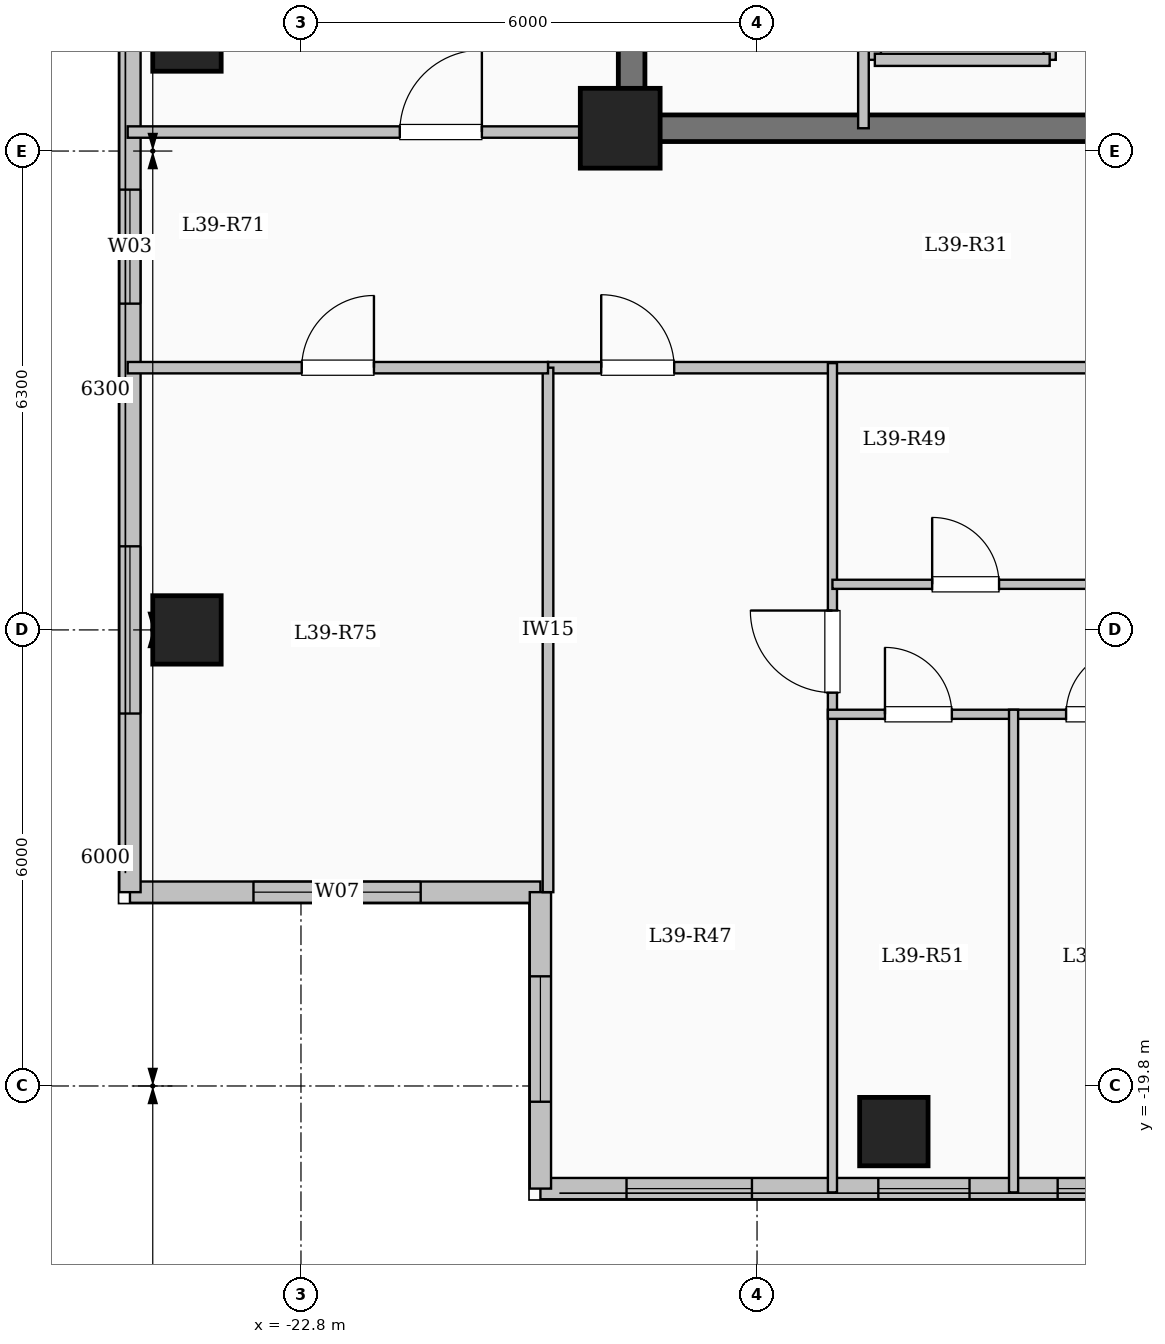
"""IFC4 building model, lengths in metres.
Left out: names, types, materials, properties, quantities, classifications, styles, units other than length and angle.
Written with IfcOpenShell. Run it as: python <this file> out.ifc"""

import sys

from ifc_helpers import new_model, si_unit, direction, frame, frame_2d, origin, origin_2d, place, context, subcontext, project, spatial, rectangle, extrude, element, fill, save


model = new_model("IFC4")
c1 = context("Model", 3, precision=1e-05, world=origin(), true_north=direction((0.0, 1.0)))
c2 = subcontext(c1, "Body", "Model", "MODEL_VIEW")
j1 = project(units=[si_unit("LENGTHUNIT", "METRE"), si_unit("PLANEANGLEUNIT", "RADIAN")], contexts=[c1])
p1 = place(None, origin())
s1 = spatial("IfcSite", under=j1, at=p1, CompositionType="ELEMENT")
p2 = place(p1, origin())
s2 = spatial("IfcBuilding", under=s1, at=p2, CompositionType="ELEMENT")
p3 = place(p2, frame((0.0, 0.0, 146.0)))
s3 = spatial("IfcBuildingStorey", under=s2, at=p3, CompositionType="ELEMENT", Elevation=146.0)
p4 = place(p3, frame((-18.6, -7.2, 0.0), z_axis=(0.0, 0.0, 1.0), x_axis=(1.0, 0.0, 0.0)))
e1 = element("IfcColumn", 1, at=p4, inside=s3, PredefinedType="COLUMN", context=c2, shape_type="SweptSolid", body=[
    extrude(rectangle(XDim=1.05, YDim=1.05, at=origin_2d()), origin(), (0.0, 0.0, 1.0), 3.35),
])
for number, where, z_axis, x_axis in (
    (2, (-15.0, -20.4, 0.0), (0.0, 0.0, 1.0), (1.0, 0.0, 0.0)),
    (3, (-24.3, -13.8, 0.0), (0.0, 0.0, 1.0), (1.0, 0.0, 0.0)),
    (4, (-24.3, -6.0, 0.0), (0.0, 0.0, 1.0), (1.0, 0.0, 0.0)),
):
    element("IfcColumn", number, at=place(p3, frame(where, z_axis=z_axis, x_axis=x_axis)), inside=s3, PredefinedType="COLUMN", context=c2, shape_type="SweptSolid", body=[
        extrude(rectangle(XDim=0.9, YDim=0.9, at=origin_2d()), origin(), (0.0, 0.0, 1.0), 3.35),
    ])
p5 = place(p3, frame((-19.65, -17.25, 0.0), z_axis=(0.0, 0.0, 1.0), x_axis=(-1.0, 0.0, 0.0)))
e5 = element("IfcWall", 5, at=p5, inside=s3, PredefinedType="SOLIDWALL", context=c2, shape_type="SweptSolid", body=[
    extrude(rectangle(XDim=5.4, YDim=0.28, at=frame_2d((2.7, 0.0))), origin(), (0.0, 0.0, 1.0), 3.1),
])
p6 = place(p5, frame((1.575, 0.0, 0.9)))
e6 = element("IfcOpeningElement", 6, at=p6, cuts=e5, PredefinedType="OPENING", context=c2, shape_type="SweptSolid", body=[
    extrude(rectangle(XDim=2.2, YDim=1.75, at=frame_2d((1.1, 0.875))), frame((0.0, 0.15, 0.0), z_axis=(0.0, -1.0, 0.0), x_axis=(1.0, 0.0, 0.0)), (0.0, 0.0, 1.0), 0.3),
])
p7 = place(p3, frame((-25.05, -17.25, 0.0), z_axis=(0.0, 0.0, 1.0), x_axis=(0.0, 1.0, 0.0)))
e7 = element("IfcWall", 7, at=p7, inside=s3, PredefinedType="SOLIDWALL", context=c2, shape_type="SweptSolid", body=[
    extrude(rectangle(XDim=34.5, YDim=0.28, at=frame_2d((17.25, 0.0))), origin(), (0.0, 0.0, 1.0), 3.1),
])
p8 = place(p7, frame((2.35, 0.0, 0.9)))
e8 = element("IfcOpeningElement", 8, at=p8, cuts=e7, PredefinedType="OPENING", context=c2, shape_type="SweptSolid", body=[
    extrude(rectangle(XDim=2.2, YDim=1.75, at=frame_2d((1.1, 0.875))), frame((0.0, 0.15, 0.0), z_axis=(0.0, -1.0, 0.0), x_axis=(1.0, 0.0, 0.0)), (0.0, 0.0, 1.0), 0.3),
])
p9 = place(p7, frame((7.742, 0.0, 0.9)))
e9 = element("IfcOpeningElement", 9, at=p9, cuts=e7, PredefinedType="OPENING", context=c2, shape_type="SweptSolid", body=[
    extrude(rectangle(XDim=1.5, YDim=1.65, at=frame_2d((0.75, 0.825))), frame((0.0, 0.15, 0.0), z_axis=(0.0, -1.0, 0.0), x_axis=(1.0, 0.0, 0.0)), (0.0, 0.0, 1.0), 0.3),
])
p10 = place(p7, frame((18.0, 0.0, 0.9)))
e10 = element("IfcOpeningElement", 10, at=p10, cuts=e7, PredefinedType="OPENING", context=c2, shape_type="SweptSolid", body=[
    extrude(rectangle(XDim=2.0, YDim=1.7, at=frame_2d((1.0, 0.85))), frame((0.0, 0.15, 0.0), z_axis=(0.0, -1.0, 0.0), x_axis=(1.0, 0.0, 0.0)), (0.0, 0.0, 1.0), 0.3),
])
p11 = place(p7, frame((28.375, 0.0, 0.95)))
e11 = element("IfcOpeningElement", 11, at=p11, cuts=e7, PredefinedType="OPENING", context=c2, shape_type="SweptSolid", body=[
    extrude(rectangle(XDim=1.0, YDim=1.5, at=frame_2d((0.5, 0.75))), frame((0.0, 0.15, 0.0), z_axis=(0.0, -1.0, 0.0), x_axis=(1.0, 0.0, 0.0)), (0.0, 0.0, 1.0), 0.3),
])
p12 = place(p7, frame((31.125, 0.0, 0.9)))
e12 = element("IfcOpeningElement", 12, at=p12, cuts=e7, PredefinedType="OPENING", context=c2, shape_type="SweptSolid", body=[
    extrude(rectangle(XDim=2.0, YDim=1.7, at=frame_2d((1.0, 0.85))), frame((0.0, 0.15, 0.0), z_axis=(0.0, -1.0, 0.0), x_axis=(1.0, 0.0, 0.0)), (0.0, 0.0, 1.0), 0.3),
])
p13 = place(p3, frame((-7.35, -21.15, 0.0), z_axis=(0.0, 0.0, 1.0), x_axis=(-1.0, 0.0, 0.0)))
e13 = element("IfcWall", 13, at=p13, inside=s3, PredefinedType="SOLIDWALL", context=c2, shape_type="SweptSolid", body=[
    extrude(rectangle(XDim=12.3, YDim=0.28, at=frame_2d((6.15, 0.0))), origin(), (0.0, 0.0, 1.0), 3.1),
])
p14 = place(p13, frame((0.147, 0.0, 0.95)))
e14 = element("IfcOpeningElement", 14, at=p14, cuts=e13, PredefinedType="OPENING", context=c2, shape_type="SweptSolid", body=[
    extrude(rectangle(XDim=0.85, YDim=1.5, at=frame_2d((0.425, 0.75))), frame((0.0, 0.15, 0.0), z_axis=(0.0, -1.0, 0.0), x_axis=(1.0, 0.0, 0.0)), (0.0, 0.0, 1.0), 0.3),
])
p15 = place(p13, frame((1.86, 0.0, 0.95)))
e15 = element("IfcOpeningElement", 15, at=p15, cuts=e13, PredefinedType="OPENING", context=c2, shape_type="SweptSolid", body=[
    extrude(rectangle(XDim=1.2, YDim=1.5, at=frame_2d((0.6, 0.75))), frame((0.0, 0.15, 0.0), z_axis=(0.0, -1.0, 0.0), x_axis=(1.0, 0.0, 0.0)), (0.0, 0.0, 1.0), 0.3),
])
p16 = place(p13, frame((4.295, 0.0, 0.95)))
e16 = element("IfcOpeningElement", 16, at=p16, cuts=e13, PredefinedType="OPENING", context=c2, shape_type="SweptSolid", body=[
    extrude(rectangle(XDim=1.2, YDim=1.5, at=frame_2d((0.6, 0.75))), frame((0.0, 0.15, 0.0), z_axis=(0.0, -1.0, 0.0), x_axis=(1.0, 0.0, 0.0)), (0.0, 0.0, 1.0), 0.3),
])
p17 = place(p13, frame((6.655, 0.0, 0.95)))
e17 = element("IfcOpeningElement", 17, at=p17, cuts=e13, PredefinedType="OPENING", context=c2, shape_type="SweptSolid", body=[
    extrude(rectangle(XDim=1.2, YDim=1.5, at=frame_2d((0.6, 0.75))), frame((0.0, 0.15, 0.0), z_axis=(0.0, -1.0, 0.0), x_axis=(1.0, 0.0, 0.0)), (0.0, 0.0, 1.0), 0.3),
])
p18 = place(p13, frame((9.517, 0.0, 0.9)))
e18 = element("IfcOpeningElement", 18, at=p18, cuts=e13, PredefinedType="OPENING", context=c2, shape_type="SweptSolid", body=[
    extrude(rectangle(XDim=1.65, YDim=1.6, at=frame_2d((0.825, 0.8))), frame((0.0, 0.15, 0.0), z_axis=(0.0, -1.0, 0.0), x_axis=(1.0, 0.0, 0.0)), (0.0, 0.0, 1.0), 0.3),
])
p19 = place(p3, frame((-19.65, -21.15, 0.0), z_axis=(0.0, 0.0, 1.0), x_axis=(0.0, 1.0, 0.0)))
e19 = element("IfcWall", 19, at=p19, inside=s3, PredefinedType="SOLIDWALL", context=c2, shape_type="SweptSolid", body=[
    extrude(rectangle(XDim=3.9, YDim=0.28, at=frame_2d((1.95, 0.0))), origin(), (0.0, 0.0, 1.0), 3.1),
])
p20 = place(p19, frame((1.143, 0.0, 0.9)))
e20 = element("IfcOpeningElement", 20, at=p20, cuts=e19, PredefinedType="OPENING", context=c2, shape_type="SweptSolid", body=[
    extrude(rectangle(XDim=1.65, YDim=1.6, at=frame_2d((0.825, 0.8))), frame((0.0, 0.15, 0.0), z_axis=(0.0, -1.0, 0.0), x_axis=(1.0, 0.0, 0.0)), (0.0, 0.0, 1.0), 0.3),
])
for number, where, z_axis, x_axis in (
    (21, (-15.25, -6.3, 0.0), (0.0, 0.0, 1.0), (0.0, 1.0, 0.0)),
    (22, (-12.95, -6.3, 0.0), (0.0, 0.0, 1.0), (0.0, 1.0, 0.0)),
):
    element("IfcWall", number, at=place(p3, frame(where, z_axis=z_axis, x_axis=x_axis)), inside=s3, PredefinedType="SOLIDWALL", context=c2, shape_type="SweptSolid", body=[
        extrude(rectangle(XDim=2.6, YDim=0.16, at=frame_2d((1.3, 0.0))), origin(), (0.0, 0.0, 1.0), 3.1),
    ])
p21 = place(p3, frame((-15.25, -6.3, 0.0), z_axis=(0.0, 0.0, 1.0), x_axis=(1.0, 0.0, 0.0)))
e23 = element("IfcWall", 23, at=p21, inside=s3, PredefinedType="SOLIDWALL", context=c2, shape_type="SweptSolid", body=[
    extrude(rectangle(XDim=2.3, YDim=0.16, at=frame_2d((1.15, 0.0))), origin(), (0.0, 0.0, 1.0), 3.1),
])
p22 = place(p3, frame((-18.45, -7.375, 0.0), z_axis=(0.0, 0.0, 1.0), x_axis=(0.0, 1.0, 0.0)))
e24 = element("IfcWall", 24, at=p22, inside=s3, PredefinedType="SHEAR", context=c2, shape_type="SweptSolid", body=[
    extrude(rectangle(XDim=14.05, YDim=0.35, at=frame_2d((7.025, 0.0))), origin(), (0.0, 0.0, 1.0), 3.35),
])
p23 = place(p3, frame((-18.625, -7.2, 0.0), z_axis=(0.0, 0.0, 1.0), x_axis=(1.0, 0.0, 0.0)))
e25 = element("IfcWall", 25, at=p23, inside=s3, PredefinedType="SHEAR", context=c2, shape_type="SweptSolid", body=[
    extrude(rectangle(XDim=8.55, YDim=0.35, at=frame_2d((4.275, 0.0))), origin(), (0.0, 0.0, 1.0), 3.35),
])
p24 = place(p3, frame((-15.4, -7.2, 0.0), z_axis=(0.0, 0.0, 1.0), x_axis=(0.0, 1.0, 0.0)))
e26 = element("IfcWall", 26, at=p24, inside=s3, PredefinedType="PARTITIONING", context=c2, shape_type="SweptSolid", body=[
    extrude(rectangle(XDim=10.45, YDim=0.14, at=frame_2d((5.225, 0.0))), origin(), (0.0, 0.0, 1.0), 3.1),
])
p25 = place(p24, frame((9.25, 0.0, 0.0)))
e27 = element("IfcOpeningElement", 27, at=p25, cuts=e26, PredefinedType="OPENING", context=c2, shape_type="SweptSolid", body=[
    extrude(rectangle(XDim=0.9, YDim=2.08, at=frame_2d((0.45, 1.04))), frame((0.0, 0.08, 0.0), z_axis=(0.0, -1.0, 0.0), x_axis=(1.0, 0.0, 0.0)), (0.0, 0.0, 1.0), 0.16),
])
p26 = place(p3, frame((-19.55, -10.35, 0.0), z_axis=(0.0, 0.0, 1.0), x_axis=(1.0, 0.0, 0.0)))
e28 = element("IfcWall", 28, at=p26, inside=s3, PredefinedType="PARTITIONING", context=c2, shape_type="SweptSolid", body=[
    extrude(rectangle(XDim=11.0, YDim=0.15, at=frame_2d((5.5, 0.0))), origin(), (0.0, 0.0, 1.0), 3.1),
])
p27 = place(p26, frame((0.7, 0.0, 0.0)))
e29 = element("IfcOpeningElement", 29, at=p27, cuts=e28, PredefinedType="OPENING", context=c2, shape_type="SweptSolid", body=[
    extrude(rectangle(XDim=0.96, YDim=2.15, at=frame_2d((0.48, 1.075))), frame((0.0, 0.085, 0.0), z_axis=(0.0, -1.0, 0.0), x_axis=(1.0, 0.0, 0.0)), (0.0, 0.0, 1.0), 0.17),
])
p28 = place(p3, frame((-15.808, -21.2, 0.0), z_axis=(0.0, 0.0, 1.0), x_axis=(0.0, 1.0, 0.0)))
e30 = element("IfcWall", 30, at=p28, inside=s3, PredefinedType="PARTITIONING", context=c2, shape_type="SweptSolid", body=[
    extrude(rectangle(XDim=10.91, YDim=0.12, at=frame_2d((5.455, 0.0))), origin(), (0.0, 0.0, 1.0), 3.1),
])
p29 = place(p28, frame((6.575, 0.0, 0.0)))
e31 = element("IfcOpeningElement", 31, at=p29, cuts=e30, PredefinedType="OPENING", context=c2, shape_type="SweptSolid", body=[
    extrude(rectangle(XDim=1.08, YDim=2.15, at=frame_2d((0.54, 1.075))), frame((0.0, 0.07, 0.0), z_axis=(0.0, -1.0, 0.0), x_axis=(1.0, 0.0, 0.0)), (0.0, 0.0, 1.0), 0.14),
])
p30 = place(p3, frame((-15.808, -13.2, 0.0), z_axis=(0.0, 0.0, 1.0), x_axis=(1.0, 0.0, 0.0)))
e32 = element("IfcWall", 32, at=p30, inside=s3, PredefinedType="PARTITIONING", context=c2, shape_type="SweptSolid", body=[
    extrude(rectangle(XDim=3.503, YDim=0.12, at=frame_2d((1.751, 0.0))), origin(), (0.0, 0.0, 1.0), 3.1),
])
p31 = place(p30, frame((1.312, 0.0, 0.0)))
e33 = element("IfcOpeningElement", 33, at=p31, cuts=e32, PredefinedType="OPENING", context=c2, shape_type="SweptSolid", body=[
    extrude(rectangle(XDim=0.88, YDim=2.1, at=frame_2d((0.44, 1.05))), frame((0.0, 0.07, 0.0), z_axis=(0.0, -1.0, 0.0), x_axis=(1.0, 0.0, 0.0)), (0.0, 0.0, 1.0), 0.14),
])
p32 = place(p3, frame((-15.868, -14.91, 0.0), z_axis=(0.0, 0.0, 1.0), x_axis=(1.0, 0.0, 0.0)))
e34 = element("IfcWall", 34, at=p32, inside=s3, PredefinedType="PARTITIONING", context=c2, shape_type="SweptSolid", body=[
    extrude(rectangle(XDim=7.328, YDim=0.12, at=frame_2d((3.664, 0.0))), origin(), (0.0, 0.0, 1.0), 3.1),
])
p33 = place(p32, frame((0.751, 0.0, 0.0)))
e35 = element("IfcOpeningElement", 35, at=p33, cuts=e34, PredefinedType="OPENING", context=c2, shape_type="SweptSolid", body=[
    extrude(rectangle(XDim=0.88, YDim=2.1, at=frame_2d((0.44, 1.05))), frame((0.0, 0.07, 0.0), z_axis=(0.0, -1.0, 0.0), x_axis=(1.0, 0.0, 0.0)), (0.0, 0.0, 1.0), 0.14),
])
p34 = place(p32, frame((3.134, 0.0, 0.0)))
e36 = element("IfcOpeningElement", 36, at=p34, cuts=e34, PredefinedType="OPENING", context=c2, shape_type="SweptSolid", body=[
    extrude(rectangle(XDim=0.88, YDim=2.1, at=frame_2d((0.44, 1.05))), frame((0.0, 0.07, 0.0), z_axis=(0.0, -1.0, 0.0), x_axis=(1.0, 0.0, 0.0)), (0.0, 0.0, 1.0), 0.14),
])
p35 = place(p32, frame((5.517, 0.0, 0.0)))
e37 = element("IfcOpeningElement", 37, at=p35, cuts=e34, PredefinedType="OPENING", context=c2, shape_type="SweptSolid", body=[
    extrude(rectangle(XDim=0.88, YDim=2.1, at=frame_2d((0.44, 1.05))), frame((0.0, 0.07, 0.0), z_axis=(0.0, -1.0, 0.0), x_axis=(1.0, 0.0, 0.0)), (0.0, 0.0, 1.0), 0.14),
])
p36 = place(p3, frame((-13.425, -21.2, 0.0), z_axis=(0.0, 0.0, 1.0), x_axis=(0.0, 1.0, 0.0)))
e38 = element("IfcWall", 38, at=p36, inside=s3, PredefinedType="PARTITIONING", context=c2, shape_type="SweptSolid", body=[
    extrude(rectangle(XDim=6.35, YDim=0.12, at=frame_2d((3.175, 0.0))), origin(), (0.0, 0.0, 1.0), 3.1),
])
p37 = place(p3, frame((-25.08, -7.25, 0.0), z_axis=(0.0, 0.0, 1.0), x_axis=(1.0, 0.0, 0.0)))
e39 = element("IfcWall", 39, at=p37, inside=s3, PredefinedType="PARTITIONING", context=c2, shape_type="SweptSolid", body=[
    extrude(rectangle(XDim=6.63, YDim=0.15, at=frame_2d((3.315, 0.0))), origin(), (0.0, 0.0, 1.0), 3.1),
])
p38 = place(p37, frame((3.58, 0.0, 0.0)))
e40 = element("IfcOpeningElement", 40, at=p38, cuts=e39, PredefinedType="OPENING", context=c2, shape_type="SweptSolid", body=[
    extrude(rectangle(XDim=1.08, YDim=2.15, at=frame_2d((0.54, 1.075))), frame((0.0, 0.085, 0.0), z_axis=(0.0, -1.0, 0.0), x_axis=(1.0, 0.0, 0.0)), (0.0, 0.0, 1.0), 0.17),
])
p39 = place(p3, frame((-19.55, -17.25, 0.0), z_axis=(0.0, 0.0, 1.0), x_axis=(0.0, 1.0, 0.0)))
e41 = element("IfcWall", 41, at=p39, inside=s3, PredefinedType="PARTITIONING", context=c2, shape_type="SweptSolid", body=[
    extrude(rectangle(XDim=6.9, YDim=0.14, at=frame_2d((3.45, 0.0))), origin(), (0.0, 0.0, 1.0), 3.1),
])
p40 = place(p3, frame((-25.08, -10.35, 0.0), z_axis=(0.0, 0.0, 1.0), x_axis=(1.0, 0.0, 0.0)))
e42 = element("IfcWall", 42, at=p40, inside=s3, PredefinedType="PARTITIONING", context=c2, shape_type="SweptSolid", body=[
    extrude(rectangle(XDim=5.53, YDim=0.15, at=frame_2d((2.765, 0.0))), origin(), (0.0, 0.0, 1.0), 3.1),
])
p41 = place(p40, frame((2.29, 0.0, 0.0)))
e43 = element("IfcOpeningElement", 43, at=p41, cuts=e42, PredefinedType="OPENING", context=c2, shape_type="SweptSolid", body=[
    extrude(rectangle(XDim=0.95, YDim=2.15, at=frame_2d((0.475, 1.075))), frame((0.0, 0.085, 0.0), z_axis=(0.0, -1.0, 0.0), x_axis=(1.0, 0.0, 0.0)), (0.0, 0.0, 1.0), 0.17),
])
p42 = place(p6, origin())
e44 = element("IfcWindow", 44, at=p42, inside=s3, PartitioningType="SINGLE_PANEL", PredefinedType="WINDOW", context=c2, shape_type="SweptSolid", body=[
    extrude(rectangle(XDim=2.2, YDim=1.75, at=frame_2d((1.1, 0.875))), frame((0.0, 0.03, 0.0), z_axis=(0.0, -1.0, 0.0), x_axis=(1.0, 0.0, 0.0)), (0.0, 0.0, 1.0), 0.06),
])
fill(e6, e44)
p43 = place(p8, origin())
e45 = element("IfcWindow", 45, at=p43, inside=s3, PartitioningType="SINGLE_PANEL", PredefinedType="WINDOW", context=c2, shape_type="SweptSolid", body=[
    extrude(rectangle(XDim=2.2, YDim=1.75, at=frame_2d((1.1, 0.875))), frame((0.0, 0.03, 0.0), z_axis=(0.0, -1.0, 0.0), x_axis=(1.0, 0.0, 0.0)), (0.0, 0.0, 1.0), 0.06),
])
fill(e8, e45)
p44 = place(p9, origin())
e46 = element("IfcWindow", 46, at=p44, inside=s3, PartitioningType="SINGLE_PANEL", PredefinedType="WINDOW", context=c2, shape_type="SweptSolid", body=[
    extrude(rectangle(XDim=1.5, YDim=1.65, at=frame_2d((0.75, 0.825))), frame((0.0, 0.03, 0.0), z_axis=(0.0, -1.0, 0.0), x_axis=(1.0, 0.0, 0.0)), (0.0, 0.0, 1.0), 0.06),
])
fill(e9, e46)
p45 = place(p16, origin())
e47 = element("IfcWindow", 47, at=p45, inside=s3, PartitioningType="SINGLE_PANEL", PredefinedType="WINDOW", context=c2, shape_type="SweptSolid", body=[
    extrude(rectangle(XDim=1.2, YDim=1.5, at=frame_2d((0.6, 0.75))), frame((0.0, 0.03, 0.0), z_axis=(0.0, -1.0, 0.0), x_axis=(1.0, 0.0, 0.0)), (0.0, 0.0, 1.0), 0.06),
])
fill(e16, e47)
p46 = place(p17, origin())
e48 = element("IfcWindow", 48, at=p46, inside=s3, PartitioningType="SINGLE_PANEL", PredefinedType="WINDOW", context=c2, shape_type="SweptSolid", body=[
    extrude(rectangle(XDim=1.2, YDim=1.5, at=frame_2d((0.6, 0.75))), frame((0.0, 0.03, 0.0), z_axis=(0.0, -1.0, 0.0), x_axis=(1.0, 0.0, 0.0)), (0.0, 0.0, 1.0), 0.06),
])
fill(e17, e48)
p47 = place(p18, origin())
e49 = element("IfcWindow", 49, at=p47, inside=s3, PartitioningType="SINGLE_PANEL", PredefinedType="WINDOW", context=c2, shape_type="SweptSolid", body=[
    extrude(rectangle(XDim=1.65, YDim=1.6, at=frame_2d((0.825, 0.8))), frame((0.0, 0.03, 0.0), z_axis=(0.0, -1.0, 0.0), x_axis=(1.0, 0.0, 0.0)), (0.0, 0.0, 1.0), 0.06),
])
fill(e18, e49)
p48 = place(p20, origin())
e50 = element("IfcWindow", 50, at=p48, inside=s3, PartitioningType="SINGLE_PANEL", PredefinedType="WINDOW", context=c2, shape_type="SweptSolid", body=[
    extrude(rectangle(XDim=1.65, YDim=1.6, at=frame_2d((0.825, 0.8))), frame((0.0, 0.03, 0.0), z_axis=(0.0, -1.0, 0.0), x_axis=(1.0, 0.0, 0.0)), (0.0, 0.0, 1.0), 0.06),
])
fill(e20, e50)
p49 = place(p27, origin())
e51 = element("IfcDoor", 51, at=p49, inside=s3, OperationType="SINGLE_SWING_LEFT", PredefinedType="DOOR", context=c2, shape_type="SweptSolid", body=[
    extrude(rectangle(XDim=0.96, YDim=2.15, at=frame_2d((0.48, 1.075))), frame((0.0, 0.025, 0.0), z_axis=(0.0, -1.0, 0.0), x_axis=(1.0, 0.0, 0.0)), (0.0, 0.0, 1.0), 0.05),
])
fill(e29, e51)
p50 = place(p29, origin())
e52 = element("IfcDoor", 52, at=p50, inside=s3, OperationType="SINGLE_SWING_RIGHT", PredefinedType="DOOR", context=c2, shape_type="SweptSolid", body=[
    extrude(rectangle(XDim=1.08, YDim=2.15, at=frame_2d((0.54, 1.075))), frame((0.0, 0.025, 0.0), z_axis=(0.0, -1.0, 0.0), x_axis=(1.0, 0.0, 0.0)), (0.0, 0.0, 1.0), 0.05),
])
fill(e31, e52)
p51 = place(p31, origin())
e53 = element("IfcDoor", 53, at=p51, inside=s3, OperationType="SINGLE_SWING_LEFT", PredefinedType="DOOR", context=c2, shape_type="SweptSolid", body=[
    extrude(rectangle(XDim=0.88, YDim=2.1, at=frame_2d((0.44, 1.05))), frame((0.0, 0.025, 0.0), z_axis=(0.0, -1.0, 0.0), x_axis=(1.0, 0.0, 0.0)), (0.0, 0.0, 1.0), 0.05),
])
fill(e33, e53)
p52 = place(p33, origin())
e54 = element("IfcDoor", 54, at=p52, inside=s3, OperationType="SINGLE_SWING_LEFT", PredefinedType="DOOR", context=c2, shape_type="SweptSolid", body=[
    extrude(rectangle(XDim=0.88, YDim=2.1, at=frame_2d((0.44, 1.05))), frame((0.0, 0.025, 0.0), z_axis=(0.0, -1.0, 0.0), x_axis=(1.0, 0.0, 0.0)), (0.0, 0.0, 1.0), 0.05),
])
fill(e35, e54)
p53 = place(p34, origin())
e55 = element("IfcDoor", 55, at=p53, inside=s3, OperationType="SINGLE_SWING_RIGHT", PredefinedType="DOOR", context=c2, shape_type="SweptSolid", body=[
    extrude(rectangle(XDim=0.88, YDim=2.1, at=frame_2d((0.44, 1.05))), frame((0.0, 0.025, 0.0), z_axis=(0.0, -1.0, 0.0), x_axis=(1.0, 0.0, 0.0)), (0.0, 0.0, 1.0), 0.05),
])
fill(e36, e55)
p54 = place(p41, origin())
e56 = element("IfcDoor", 56, at=p54, inside=s3, OperationType="SINGLE_SWING_RIGHT", PredefinedType="DOOR", context=c2, shape_type="SweptSolid", body=[
    extrude(rectangle(XDim=0.95, YDim=2.15, at=frame_2d((0.475, 1.075))), frame((0.0, 0.025, 0.0), z_axis=(0.0, -1.0, 0.0), x_axis=(1.0, 0.0, 0.0)), (0.0, 0.0, 1.0), 0.05),
])
fill(e43, e56)
p55 = place(p38, origin())
e57 = element("IfcDoor", 57, at=p55, inside=s3, OperationType="SINGLE_SWING_RIGHT", PredefinedType="DOOR", context=c2, shape_type="SweptSolid", body=[
    extrude(rectangle(XDim=1.08, YDim=2.15, at=frame_2d((0.54, 1.075))), frame((0.0, 0.025, 0.0), z_axis=(0.0, -1.0, 0.0), x_axis=(1.0, 0.0, 0.0)), (0.0, 0.0, 1.0), 0.05),
])
fill(e40, e57)
save(model, sys.argv[1])
